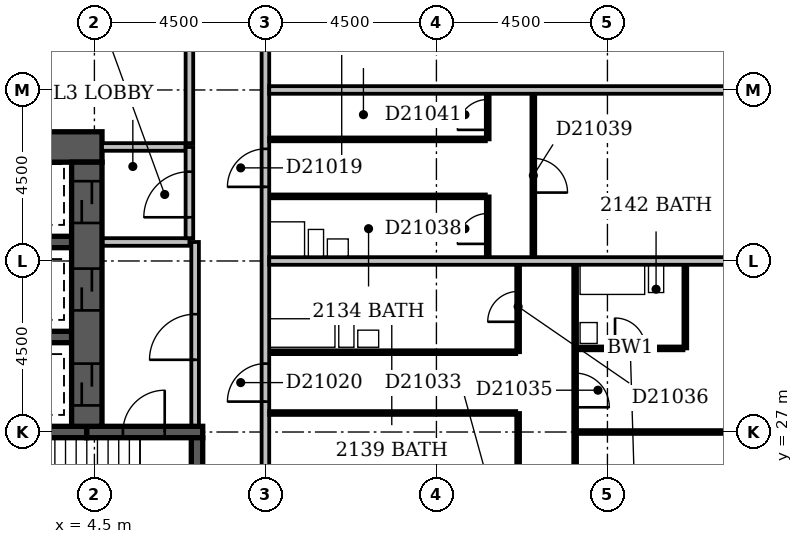
"""IFC4 building model, lengths in metres.
Left out: names, types, materials, properties, quantities, classifications, styles, units other than length and angle.
Written with IfcOpenShell. Run it as: python <this file> out.ifc"""

import sys

from ifc_helpers import new_model, si_unit, direction, frame, frame_2d, origin, place, context, subcontext, project, spatial, rectangle, extrude, element, fill, save


model = new_model("IFC4")
c1 = context("Model", 3, precision=1e-05, world=origin(), true_north=direction((0.0, 1.0)))
c2 = subcontext(c1, "Body", "Model", "MODEL_VIEW")
j1 = project(units=[si_unit("LENGTHUNIT", "METRE"), si_unit("PLANEANGLEUNIT", "RADIAN")], contexts=[c1])
p1 = place(None, origin())
s1 = spatial("IfcSite", under=j1, at=p1, CompositionType="ELEMENT")
p2 = place(p1, origin())
s2 = spatial("IfcBuilding", under=s1, at=p2, CompositionType="ELEMENT")
p3 = place(p2, frame((0.0, 0.0, 86.6)))
s3 = spatial("IfcBuildingStorey", under=s2, at=p3, CompositionType="ELEMENT", Elevation=86.6)
p4 = place(p3, frame((0.1, 34.5, -0.3), z_axis=(0.0, 0.0, 1.0), x_axis=(1.0, 0.0, 0.0)))
e1 = element("IfcWall", 1, at=p4, inside=s3, PredefinedType="SHEAR", context=c2, shape_type="SweptSolid", body=[
    extrude(rectangle(XDim=4.6, YDim=0.8, at=frame_2d((2.3, 0.0))), origin(), (0.0, 0.0, 1.0), 3.6),
])
p5 = place(p3, frame((0.35, 27.0, -0.3), z_axis=(0.0, 0.0, 1.0), x_axis=(1.0, 0.0, 0.0)))
e2 = element("IfcWall", 2, at=p5, inside=s3, PredefinedType="SHEAR", context=c2, shape_type="SweptSolid", body=[
    extrude(rectangle(XDim=3.95, YDim=0.3, at=frame_2d((1.975, 0.0))), origin(), (0.0, 0.0, 1.0), 3.6),
])
for number, where, z_axis, x_axis in (
    (3, (0.9, 29.5, -0.3), (0.0, 0.0, 1.0), (1.0, 0.0, 0.0)),
    (4, (0.9, 32.0, -0.3), (0.0, 0.0, 1.0), (1.0, 0.0, 0.0)),
):
    element("IfcWall", number, at=place(p3, frame(where, z_axis=z_axis, x_axis=x_axis)), inside=s3, PredefinedType="SHEAR", context=c2, shape_type="SweptSolid", body=[
        extrude(rectangle(XDim=3.0, YDim=0.3, at=frame_2d((1.5, 0.0))), origin(), (0.0, 0.0, 1.0), 3.6),
    ])
p6 = place(p3, frame((4.3, 27.0, -0.3), z_axis=(0.0, 0.0, 1.0), x_axis=(1.0, 0.0, 0.0)))
e5 = element("IfcWall", 5, at=p6, inside=s3, PredefinedType="SHEAR", context=c2, shape_type="SweptSolid", body=[
    extrude(rectangle(XDim=3.05, YDim=0.3, at=frame_2d((1.525, 0.0))), origin(), (0.0, 0.0, 1.0), 3.6),
])
p7 = place(p6, frame((0.95, 0.0, 0.3)))
e6 = element("IfcOpeningElement", 6, at=p7, cuts=e5, PredefinedType="OPENING", context=c2, shape_type="SweptSolid", body=[
    extrude(rectangle(XDim=1.1, YDim=2.1, at=frame_2d((0.55, 1.05))), frame((0.0, 0.162, 0.0), z_axis=(0.0, -1.0, 0.0), x_axis=(1.0, 0.0, 0.0)), (0.0, 0.0, 1.0), 0.324),
])
p8 = place(p3, frame((4.3, 27.15, -0.3), z_axis=(0.0, 0.0, 1.0), x_axis=(0.0, 1.0, 0.0)))
e7 = element("IfcWall", 7, at=p8, inside=s3, PredefinedType="SHEAR", context=c2, shape_type="SweptSolid", body=[
    extrude(rectangle(XDim=6.95, YDim=0.8, at=frame_2d((3.475, 0.0))), origin(), (0.0, 0.0, 1.0), 3.6),
])
p9 = place(p8, frame((3.05, 0.0, 0.3)))
e8 = element("IfcOpeningElement", 8, at=p9, cuts=e7, PredefinedType="OPENING", context=c2, shape_type="SweptSolid", body=[
    extrude(rectangle(XDim=1.1, YDim=2.1, at=frame_2d((0.55, 1.05))), frame((0.0, 0.412, 0.0), z_axis=(0.0, -1.0, 0.0), x_axis=(1.0, 0.0, 0.0)), (0.0, 0.0, 1.0), 0.824),
])
p10 = place(p8, frame((0.55, 0.0, 0.3)))
e9 = element("IfcOpeningElement", 9, at=p10, cuts=e7, PredefinedType="OPENING", context=c2, shape_type="SweptSolid", body=[
    extrude(rectangle(XDim=1.1, YDim=2.1, at=frame_2d((0.55, 1.05))), frame((0.0, 0.412, 0.0), z_axis=(0.0, -1.0, 0.0), x_axis=(1.0, 0.0, 0.0)), (0.0, 0.0, 1.0), 0.824),
])
p11 = place(p8, frame((5.35, 0.0, 0.3)))
e10 = element("IfcOpeningElement", 10, at=p11, cuts=e7, PredefinedType="OPENING", context=c2, shape_type="SweptSolid", body=[
    extrude(rectangle(XDim=1.1, YDim=2.1, at=frame_2d((0.55, 1.05))), frame((0.0, 0.412, 0.0), z_axis=(0.0, -1.0, 0.0), x_axis=(1.0, 0.0, 0.0)), (0.0, 0.0, 1.0), 0.824),
])
p12 = place(p3, frame((7.2, 22.65, -0.3), z_axis=(0.0, 0.0, 1.0), x_axis=(0.0, 1.0, 0.0)))
e11 = element("IfcWall", 11, at=p12, inside=s3, PredefinedType="SHEAR", context=c2, shape_type="SweptSolid", body=[
    extrude(rectangle(XDim=4.2, YDim=0.3, at=frame_2d((2.1, 0.0))), origin(), (0.0, 0.0, 1.0), 3.6),
])
p13 = place(p12, frame((0.8, 0.0, 0.3)))
e12 = element("IfcOpeningElement", 12, at=p13, cuts=e11, PredefinedType="OPENING", context=c2, shape_type="SweptSolid", body=[
    extrude(rectangle(XDim=1.1, YDim=2.1, at=frame_2d((0.55, 1.05))), frame((0.0, 0.162, 0.0), z_axis=(0.0, -1.0, 0.0), x_axis=(1.0, 0.0, 0.0)), (0.0, 0.0, 1.0), 0.324),
])
p14 = place(p3, frame((4.72, 32.0, 0.0), z_axis=(0.0, 0.0, 1.0), x_axis=(1.0, 0.0, 0.0)))
e13 = element("IfcWall", 13, at=p14, inside=s3, PredefinedType="PARTITIONING", context=c2, shape_type="SweptSolid", body=[
    extrude(rectangle(XDim=2.28, YDim=0.2, at=frame_2d((1.14, 0.0))), origin(), (0.0, 0.0, 1.0), 3.3),
])
p15 = place(p3, frame((7.0, 32.1, 0.0), z_axis=(0.0, 0.0, 1.0), x_axis=(0.0, 1.0, 0.0)))
e14 = element("IfcWall", 14, at=p15, inside=s3, PredefinedType="PARTITIONING", context=c2, shape_type="SweptSolid", body=[
    extrude(rectangle(XDim=2.4, YDim=0.2, at=frame_2d((1.2, 0.0))), origin(), (0.0, 0.0, 1.0), 3.3),
])
p16 = place(p15, frame((0.55, 0.0, 0.0)))
e15 = element("IfcOpeningElement", 15, at=p16, cuts=e14, PredefinedType="OPENING", context=c2, shape_type="SweptSolid", body=[
    extrude(rectangle(XDim=1.2, YDim=2.1, at=frame_2d((0.6, 1.05))), frame((0.0, 0.112, 0.0), z_axis=(0.0, -1.0, 0.0), x_axis=(1.0, 0.0, 0.0)), (0.0, 0.0, 1.0), 0.224),
])
p17 = place(p3, frame((4.7, 34.5, 0.0), z_axis=(0.0, 0.0, 1.0), x_axis=(1.0, 0.0, 0.0)))
e16 = element("IfcWall", 16, at=p17, inside=s3, PredefinedType="PARTITIONING", context=c2, shape_type="SweptSolid", body=[
    extrude(rectangle(XDim=2.2, YDim=0.2, at=frame_2d((1.1, 0.0))), origin(), (0.0, 0.0, 1.0), 3.3),
])
p18 = place(p3, frame((7.15, 27.17, 0.0), z_axis=(0.0, 0.0, 1.0), x_axis=(0.0, 1.0, 0.0)))
e17 = element("IfcWall", 17, at=p18, inside=s3, PredefinedType="PARTITIONING", context=c2, shape_type="SweptSolid", body=[
    extrude(rectangle(XDim=4.83, YDim=0.2, at=frame_2d((2.415, 0.0))), origin(), (0.0, 0.0, 1.0), 3.3),
])
p19 = place(p18, frame((1.73, 0.0, 0.0)))
e18 = element("IfcOpeningElement", 18, at=p19, cuts=e17, PredefinedType="OPENING", context=c2, shape_type="SweptSolid", body=[
    extrude(rectangle(XDim=1.2, YDim=2.1, at=frame_2d((0.6, 1.05))), frame((0.0, 0.112, 0.0), z_axis=(0.0, -1.0, 0.0), x_axis=(1.0, 0.0, 0.0)), (0.0, 0.0, 1.0), 0.224),
])
p20 = place(p3, frame((9.0, 5.0, 0.0), z_axis=(0.0, 0.0, 1.0), x_axis=(0.0, 1.0, 0.0)))
e19 = element("IfcWall", 19, at=p20, inside=s3, PredefinedType="PARTITIONING", context=c2, shape_type="SweptSolid", body=[
    extrude(rectangle(XDim=44.5, YDim=0.2, at=frame_2d((22.25, 0.0))), origin(), (0.0, 0.0, 1.0), 3.3),
])
p21 = place(p20, frame((28.45, 0.0, 0.0)))
e20 = element("IfcOpeningElement", 20, at=p21, cuts=e19, PredefinedType="OPENING", context=c2, shape_type="SweptSolid", body=[
    extrude(rectangle(XDim=1.0, YDim=2.1, at=frame_2d((0.5, 1.05))), frame((0.0, 0.112, 0.0), z_axis=(0.0, -1.0, 0.0), x_axis=(1.0, 0.0, 0.0)), (0.0, 0.0, 1.0), 0.224),
])
p22 = place(p20, frame((22.8, 0.0, 0.0)))
e21 = element("IfcOpeningElement", 21, at=p22, cuts=e19, PredefinedType="OPENING", context=c2, shape_type="SweptSolid", body=[
    extrude(rectangle(XDim=1.0, YDim=2.1, at=frame_2d((0.5, 1.05))), frame((0.0, 0.112, 0.0), z_axis=(0.0, -1.0, 0.0), x_axis=(1.0, 0.0, 0.0)), (0.0, 0.0, 1.0), 0.224),
])
p23 = place(p20, frame((14.55, 0.0, 0.0)))
e22 = element("IfcOpeningElement", 22, at=p23, cuts=e19, PredefinedType="OPENING", context=c2, shape_type="SweptSolid", body=[
    extrude(rectangle(XDim=1.0, YDim=2.1, at=frame_2d((0.5, 1.05))), frame((0.0, 0.112, 0.0), z_axis=(0.0, -1.0, 0.0), x_axis=(1.0, 0.0, 0.0)), (0.0, 0.0, 1.0), 0.224),
])
p24 = place(p20, frame((9.3, 0.0, 0.0)))
e23 = element("IfcOpeningElement", 23, at=p24, cuts=e19, PredefinedType="OPENING", context=c2, shape_type="SweptSolid", body=[
    extrude(rectangle(XDim=1.0, YDim=2.1, at=frame_2d((0.5, 1.05))), frame((0.0, 0.112, 0.0), z_axis=(0.0, -1.0, 0.0), x_axis=(1.0, 0.0, 0.0)), (0.0, 0.0, 1.0), 0.224),
])
p25 = place(p20, frame((35.0, 0.0, 0.0)))
e24 = element("IfcOpeningElement", 24, at=p25, cuts=e19, PredefinedType="OPENING", context=c2, shape_type="SweptSolid", body=[
    extrude(rectangle(XDim=0.9, YDim=2.1, at=frame_2d((0.45, 1.05))), frame((0.0, 0.112, 0.0), z_axis=(0.0, -1.0, 0.0), x_axis=(1.0, 0.0, 0.0)), (0.0, 0.0, 1.0), 0.224),
])
p26 = place(p20, frame((1.5, 0.0, 0.0)))
e25 = element("IfcOpeningElement", 25, at=p26, cuts=e19, PredefinedType="OPENING", context=c2, shape_type="SweptSolid", body=[
    extrude(rectangle(XDim=0.9, YDim=2.1, at=frame_2d((0.45, 1.05))), frame((0.0, 0.112, 0.0), z_axis=(0.0, -1.0, 0.0), x_axis=(1.0, 0.0, 0.0)), (0.0, 0.0, 1.0), 0.224),
])
p27 = place(p3, frame((15.65, 22.6, 0.0), z_axis=(0.0, 0.0, 1.0), x_axis=(0.0, 1.0, 0.0)))
e26 = element("IfcWall", 26, at=p27, inside=s3, PredefinedType="PARTITIONING", context=c2, shape_type="SweptSolid", body=[
    extrude(rectangle(XDim=4.9, YDim=0.1, at=frame_2d((2.45, 0.0))), origin(), (0.0, 0.0, 1.0), 3.3),
])
p28 = place(p27, frame((1.95, 0.0, 0.0)))
e27 = element("IfcOpeningElement", 27, at=p28, cuts=e26, PredefinedType="OPENING", context=c2, shape_type="SweptSolid", body=[
    extrude(rectangle(XDim=0.9, YDim=2.1, at=frame_2d((0.45, 1.05))), frame((0.0, 0.062, 0.0), z_axis=(0.0, -1.0, 0.0), x_axis=(1.0, 0.0, 0.0)), (0.0, 0.0, 1.0), 0.124),
])
p29 = place(p3, frame((17.15, 22.6, 0.0), z_axis=(0.0, 0.0, 1.0), x_axis=(0.0, 1.0, 0.0)))
e28 = element("IfcWall", 28, at=p29, inside=s3, PredefinedType="PARTITIONING", context=c2, shape_type="SweptSolid", body=[
    extrude(rectangle(XDim=8.8, YDim=0.1, at=frame_2d((4.4, 0.0))), origin(), (0.0, 0.0, 1.0), 3.3),
])
p30 = place(p29, frame((1.7, 0.0, 0.0)))
e29 = element("IfcOpeningElement", 29, at=p30, cuts=e28, PredefinedType="OPENING", context=c2, shape_type="SweptSolid", body=[
    extrude(rectangle(XDim=0.9, YDim=2.1, at=frame_2d((0.45, 1.05))), frame((0.0, 0.062, 0.0), z_axis=(0.0, -1.0, 0.0), x_axis=(1.0, 0.0, 0.0)), (0.0, 0.0, 1.0), 0.124),
])
p31 = place(p29, frame((5.05, 0.0, 0.0)))
e30 = element("IfcOpeningElement", 30, at=p31, cuts=e28, PredefinedType="OPENING", context=c2, shape_type="SweptSolid", body=[
    extrude(rectangle(XDim=0.9, YDim=2.1, at=frame_2d((0.45, 1.05))), frame((0.0, 0.062, 0.0), z_axis=(0.0, -1.0, 0.0), x_axis=(1.0, 0.0, 0.0)), (0.0, 0.0, 1.0), 0.124),
])
p32 = place(p3, frame((17.2, 27.0, 0.0), z_axis=(0.0, 0.0, 1.0), x_axis=(1.0, 0.0, 0.0)))
e31 = element("IfcWall", 31, at=p32, inside=s3, PredefinedType="PARTITIONING", context=c2, shape_type="SweptSolid", body=[
    extrude(rectangle(XDim=4.7, YDim=0.1, at=frame_2d((2.35, 0.0))), origin(), (0.0, 0.0, 1.0), 2.7),
])
p33 = place(p3, frame((9.1, 27.5, 0.0), z_axis=(0.0, 0.0, 1.0), x_axis=(1.0, 0.0, 0.0)))
e32 = element("IfcWall", 32, at=p33, inside=s3, PredefinedType="PARTITIONING", context=c2, shape_type="SweptSolid", body=[
    extrude(rectangle(XDim=6.5, YDim=0.1, at=frame_2d((3.25, 0.0))), origin(), (0.0, 0.0, 1.0), 2.7),
])
p34 = place(p3, frame((9.1, 29.1, 0.0), z_axis=(0.0, 0.0, 1.0), x_axis=(1.0, 0.0, 0.0)))
e33 = element("IfcWall", 33, at=p34, inside=s3, PredefinedType="PLUMBINGWALL", context=c2, shape_type="SweptSolid", body=[
    extrude(rectangle(XDim=6.5, YDim=0.1, at=frame_2d((3.25, 0.0))), origin(), (0.0, 0.0, 1.0), 3.3),
])
p35 = place(p3, frame((15.65, 29.1, 0.0), z_axis=(0.0, 0.0, 1.0), x_axis=(0.0, 1.0, 0.0)))
e34 = element("IfcWall", 34, at=p35, inside=s3, PredefinedType="PARTITIONING", context=c2, shape_type="SweptSolid", body=[
    extrude(rectangle(XDim=2.3, YDim=0.1, at=frame_2d((1.15, 0.0))), origin(), (0.0, 0.0, 1.0), 3.3),
])
p36 = place(p35, frame((0.8, 0.0, 0.0)))
e35 = element("IfcOpeningElement", 35, at=p36, cuts=e34, PredefinedType="OPENING", context=c2, shape_type="SweptSolid", body=[
    extrude(rectangle(XDim=0.8, YDim=2.1, at=frame_2d((0.4, 1.05))), frame((0.0, 0.062, 0.0), z_axis=(0.0, -1.0, 0.0), x_axis=(1.0, 0.0, 0.0)), (0.0, 0.0, 1.0), 0.124),
])
p37 = place(p3, frame((17.2, 29.2, 0.0), z_axis=(0.0, 0.0, 1.0), x_axis=(1.0, 0.0, 0.0)))
e36 = element("IfcWall", 36, at=p37, inside=s3, PredefinedType="PLUMBINGWALL", context=c2, shape_type="SweptSolid", body=[
    extrude(rectangle(XDim=2.8, YDim=0.1, at=frame_2d((1.4, 0.0))), origin(), (0.0, 0.0, 1.0), 3.3),
])
p38 = place(p37, frame((1.0, 0.0, 0.0)))
e37 = element("IfcOpeningElement", 37, at=p38, cuts=e36, PredefinedType="OPENING", context=c2, shape_type="SweptSolid", body=[
    extrude(rectangle(XDim=0.8, YDim=2.1, at=frame_2d((0.4, 1.05))), frame((0.0, 0.062, 0.0), z_axis=(0.0, -1.0, 0.0), x_axis=(1.0, 0.0, 0.0)), (0.0, 0.0, 1.0), 0.124),
])
p39 = place(p3, frame((20.05, 29.2, 0.0), z_axis=(0.0, 0.0, 1.0), x_axis=(0.0, 1.0, 0.0)))
e38 = element("IfcWall", 38, at=p39, inside=s3, PredefinedType="PLUMBINGWALL", context=c2, shape_type="SweptSolid", body=[
    extrude(rectangle(XDim=2.2, YDim=0.1, at=frame_2d((1.1, 0.0))), origin(), (0.0, 0.0, 1.0), 3.3),
])
p40 = place(p3, frame((9.1, 31.5, 0.0), z_axis=(0.0, 0.0, 1.0), x_axis=(1.0, 0.0, 0.0)))
e39 = element("IfcWall", 39, at=p40, inside=s3, PredefinedType="PARTITIONING", context=c2, shape_type="SweptSolid", body=[
    extrude(rectangle(XDim=12.8, YDim=0.2, at=frame_2d((6.4, 0.0))), origin(), (0.0, 0.0, 1.0), 3.3),
])
p41 = place(p3, frame((14.85, 31.6, 0.0), z_axis=(0.0, 0.0, 1.0), x_axis=(0.0, 1.0, 0.0)))
e40 = element("IfcWall", 40, at=p41, inside=s3, PredefinedType="PARTITIONING", context=c2, shape_type="SweptSolid", body=[
    extrude(rectangle(XDim=1.6, YDim=0.1, at=frame_2d((0.8, 0.0))), origin(), (0.0, 0.0, 1.0), 3.3),
])
p42 = place(p41, frame((0.35, 0.0, 0.0)))
e41 = element("IfcOpeningElement", 41, at=p42, cuts=e40, PredefinedType="OPENING", context=c2, shape_type="SweptSolid", body=[
    extrude(rectangle(XDim=0.8, YDim=2.1, at=frame_2d((0.4, 1.05))), frame((0.0, 0.062, 0.0), z_axis=(0.0, -1.0, 0.0), x_axis=(1.0, 0.0, 0.0)), (0.0, 0.0, 1.0), 0.124),
])
p43 = place(p3, frame((16.05, 31.6, 0.0), z_axis=(0.0, 0.0, 1.0), x_axis=(0.0, 1.0, 0.0)))
e42 = element("IfcWall", 42, at=p43, inside=s3, PredefinedType="PARTITIONING", context=c2, shape_type="SweptSolid", body=[
    extrude(rectangle(XDim=4.3, YDim=0.1, at=frame_2d((2.15, 0.0))), origin(), (0.0, 0.0, 1.0), 3.3),
])
p44 = place(p43, frame((1.7, 0.0, 0.0)))
e43 = element("IfcOpeningElement", 43, at=p44, cuts=e42, PredefinedType="OPENING", context=c2, shape_type="SweptSolid", body=[
    extrude(rectangle(XDim=0.9, YDim=2.1, at=frame_2d((0.45, 1.05))), frame((0.0, 0.062, 0.0), z_axis=(0.0, -1.0, 0.0), x_axis=(1.0, 0.0, 0.0)), (0.0, 0.0, 1.0), 0.124),
])
p45 = place(p3, frame((9.1, 33.2, 0.0), z_axis=(0.0, 0.0, 1.0), x_axis=(1.0, 0.0, 0.0)))
e44 = element("IfcWall", 44, at=p45, inside=s3, PredefinedType="PLUMBINGWALL", context=c2, shape_type="SweptSolid", body=[
    extrude(rectangle(XDim=5.7, YDim=0.1, at=frame_2d((2.85, 0.0))), origin(), (0.0, 0.0, 1.0), 3.3),
])
p46 = place(p3, frame((7.0, 34.6, 0.0), z_axis=(0.0, 0.0, 1.0), x_axis=(0.0, 1.0, 0.0)))
e45 = element("IfcWall", 45, at=p46, inside=s3, PredefinedType="PARTITIONING", context=c2, shape_type="SweptSolid", body=[
    extrude(rectangle(XDim=14.8, YDim=0.2, at=frame_2d((7.4, 0.0))), origin(), (0.0, 0.0, 1.0), 3.3),
])
p47 = place(p46, frame((6.95, 0.0, 0.0)))
e46 = element("IfcOpeningElement", 46, at=p47, cuts=e45, PredefinedType="OPENING", context=c2, shape_type="SweptSolid", body=[
    extrude(rectangle(XDim=0.9, YDim=2.1, at=frame_2d((0.45, 1.05))), frame((0.0, 0.112, 0.0), z_axis=(0.0, -1.0, 0.0), x_axis=(1.0, 0.0, 0.0)), (0.0, 0.0, 1.0), 0.224),
])
p48 = place(p3, frame((9.1, 34.7, 0.0), z_axis=(0.0, 0.0, 1.0), x_axis=(1.0, 0.0, 0.0)))
e47 = element("IfcWall", 47, at=p48, inside=s3, PredefinedType="PARTITIONING", context=c2, shape_type="SweptSolid", body=[
    extrude(rectangle(XDim=5.7, YDim=0.1, at=frame_2d((2.85, 0.0))), origin(), (0.0, 0.0, 1.0), 3.3),
])
p49 = place(p3, frame((14.85, 34.7, 0.0), z_axis=(0.0, 0.0, 1.0), x_axis=(0.0, 1.0, 0.0)))
e48 = element("IfcWall", 48, at=p49, inside=s3, PredefinedType="PARTITIONING", context=c2, shape_type="SweptSolid", body=[
    extrude(rectangle(XDim=1.2, YDim=0.1, at=frame_2d((0.6, 0.0))), origin(), (0.0, 0.0, 1.0), 3.3),
])
p50 = place(p49, frame((0.25, 0.0, 0.0)))
e49 = element("IfcOpeningElement", 49, at=p50, cuts=e48, PredefinedType="OPENING", context=c2, shape_type="SweptSolid", body=[
    extrude(rectangle(XDim=0.8, YDim=2.1, at=frame_2d((0.4, 1.05))), frame((0.0, 0.062, 0.0), z_axis=(0.0, -1.0, 0.0), x_axis=(1.0, 0.0, 0.0)), (0.0, 0.0, 1.0), 0.124),
])
p51 = place(p3, frame((9.1, 36.0, 0.0), z_axis=(0.0, 0.0, 1.0), x_axis=(1.0, 0.0, 0.0)))
e50 = element("IfcWall", 50, at=p51, inside=s3, PredefinedType="PARTITIONING", context=c2, shape_type="SweptSolid", body=[
    extrude(rectangle(XDim=12.8, YDim=0.2, at=frame_2d((6.4, 0.0))), origin(), (0.0, 0.0, 1.0), 2.4),
])
p52 = place(p19, origin())
e51 = element("IfcDoor", 51, at=p52, inside=s3, OperationType="SINGLE_SWING_LEFT", PredefinedType="DOOR", context=c2, shape_type="SweptSolid", body=[
    extrude(rectangle(XDim=1.2, YDim=2.1, at=frame_2d((0.6, 1.05))), frame((0.0, 0.025, 0.0), z_axis=(0.0, -1.0, 0.0), x_axis=(1.0, 0.0, 0.0)), (0.0, 0.0, 1.0), 0.05),
])
fill(e18, e51)
p53 = place(p9, origin())
e52 = element("IfcDoor", 52, at=p53, inside=s3, OperationType="SLIDING_TO_LEFT", PredefinedType="DOOR", context=c2, shape_type="SweptSolid", body=[
    extrude(rectangle(XDim=1.1, YDim=2.1, at=frame_2d((0.55, 1.05))), frame((0.0, 0.025, 0.0), z_axis=(0.0, -1.0, 0.0), x_axis=(1.0, 0.0, 0.0)), (0.0, 0.0, 1.0), 0.05),
])
fill(e8, e52)
p54 = place(p10, origin())
e53 = element("IfcDoor", 53, at=p54, inside=s3, OperationType="SLIDING_TO_LEFT", PredefinedType="DOOR", context=c2, shape_type="SweptSolid", body=[
    extrude(rectangle(XDim=1.1, YDim=2.1, at=frame_2d((0.55, 1.05))), frame((0.0, 0.025, 0.0), z_axis=(0.0, -1.0, 0.0), x_axis=(1.0, 0.0, 0.0)), (0.0, 0.0, 1.0), 0.05),
])
fill(e9, e53)
p55 = place(p16, origin())
e54 = element("IfcDoor", 54, at=p55, inside=s3, OperationType="SINGLE_SWING_LEFT", PredefinedType="DOOR", context=c2, shape_type="SweptSolid", body=[
    extrude(rectangle(XDim=1.2, YDim=2.1, at=frame_2d((0.6, 1.05))), frame((0.0, 0.025, 0.0), z_axis=(0.0, -1.0, 0.0), x_axis=(1.0, 0.0, 0.0)), (0.0, 0.0, 1.0), 0.05),
])
fill(e15, e54)
p56 = place(p11, origin())
e55 = element("IfcDoor", 55, at=p56, inside=s3, OperationType="SLIDING_TO_LEFT", PredefinedType="DOOR", context=c2, shape_type="SweptSolid", body=[
    extrude(rectangle(XDim=1.1, YDim=2.1, at=frame_2d((0.55, 1.05))), frame((0.0, 0.025, 0.0), z_axis=(0.0, -1.0, 0.0), x_axis=(1.0, 0.0, 0.0)), (0.0, 0.0, 1.0), 0.05),
])
fill(e10, e55)
p57 = place(p7, frame((1.1, 0.0, 0.0), z_axis=(0.0, 0.0, 1.0), x_axis=(-1.0, 0.0, 0.0)))
e56 = element("IfcDoor", 56, at=p57, inside=s3, OperationType="SINGLE_SWING_LEFT", PredefinedType="DOOR", context=c2, shape_type="SweptSolid", body=[
    extrude(rectangle(XDim=1.1, YDim=2.1, at=frame_2d((0.55, 1.05))), frame((0.0, 0.025, 0.0), z_axis=(0.0, -1.0, 0.0), x_axis=(1.0, 0.0, 0.0)), (0.0, 0.0, 1.0), 0.05),
])
fill(e6, e56)
p58 = place(p21, origin())
e57 = element("IfcDoor", 57, at=p58, inside=s3, OperationType="SINGLE_SWING_LEFT", PredefinedType="DOOR", context=c2, shape_type="SweptSolid", body=[
    extrude(rectangle(XDim=1.0, YDim=2.1, at=frame_2d((0.5, 1.05))), frame((0.0, 0.025, 0.0), z_axis=(0.0, -1.0, 0.0), x_axis=(1.0, 0.0, 0.0)), (0.0, 0.0, 1.0), 0.05),
])
fill(e20, e57)
p59 = place(p22, origin())
e58 = element("IfcDoor", 58, at=p59, inside=s3, OperationType="SINGLE_SWING_LEFT", PredefinedType="DOOR", context=c2, shape_type="SweptSolid", body=[
    extrude(rectangle(XDim=1.0, YDim=2.1, at=frame_2d((0.5, 1.05))), frame((0.0, 0.025, 0.0), z_axis=(0.0, -1.0, 0.0), x_axis=(1.0, 0.0, 0.0)), (0.0, 0.0, 1.0), 0.05),
])
fill(e21, e58)
p60 = place(p31, frame((0.9, 0.0, 0.0), z_axis=(0.0, 0.0, 1.0), x_axis=(-1.0, 0.0, 0.0)))
e59 = element("IfcDoor", 59, at=p60, inside=s3, OperationType="SINGLE_SWING_RIGHT", PredefinedType="DOOR", context=c2, shape_type="SweptSolid", body=[
    extrude(rectangle(XDim=0.9, YDim=2.1, at=frame_2d((0.45, 1.05))), frame((0.0, 0.025, 0.0), z_axis=(0.0, -1.0, 0.0), x_axis=(1.0, 0.0, 0.0)), (0.0, 0.0, 1.0), 0.05),
])
fill(e30, e59)
p61 = place(p36, origin())
e60 = element("IfcDoor", 60, at=p61, inside=s3, OperationType="SINGLE_SWING_LEFT", PredefinedType="DOOR", context=c2, shape_type="SweptSolid", body=[
    extrude(rectangle(XDim=0.8, YDim=2.1, at=frame_2d((0.4, 1.05))), frame((0.0, 0.025, 0.0), z_axis=(0.0, -1.0, 0.0), x_axis=(1.0, 0.0, 0.0)), (0.0, 0.0, 1.0), 0.05),
])
fill(e35, e60)
p62 = place(p38, origin())
e61 = element("IfcDoor", 61, at=p62, inside=s3, OperationType="SINGLE_SWING_LEFT", PredefinedType="DOOR", context=c2, shape_type="SweptSolid", body=[
    extrude(rectangle(XDim=0.8, YDim=2.1, at=frame_2d((0.4, 1.05))), frame((0.0, 0.025, 0.0), z_axis=(0.0, -1.0, 0.0), x_axis=(1.0, 0.0, 0.0)), (0.0, 0.0, 1.0), 0.05),
])
fill(e37, e61)
p63 = place(p42, origin())
e62 = element("IfcDoor", 62, at=p63, inside=s3, OperationType="SINGLE_SWING_LEFT", PredefinedType="DOOR", context=c2, shape_type="SweptSolid", body=[
    extrude(rectangle(XDim=0.8, YDim=2.1, at=frame_2d((0.4, 1.05))), frame((0.0, 0.025, 0.0), z_axis=(0.0, -1.0, 0.0), x_axis=(1.0, 0.0, 0.0)), (0.0, 0.0, 1.0), 0.05),
])
fill(e41, e62)
p64 = place(p44, frame((0.9, 0.0, 0.0), z_axis=(0.0, 0.0, 1.0), x_axis=(-1.0, 0.0, 0.0)))
e63 = element("IfcDoor", 63, at=p64, inside=s3, OperationType="SINGLE_SWING_RIGHT", PredefinedType="DOOR", context=c2, shape_type="SweptSolid", body=[
    extrude(rectangle(XDim=0.9, YDim=2.1, at=frame_2d((0.45, 1.05))), frame((0.0, 0.025, 0.0), z_axis=(0.0, -1.0, 0.0), x_axis=(1.0, 0.0, 0.0)), (0.0, 0.0, 1.0), 0.05),
])
fill(e43, e63)
p65 = place(p50, origin())
e64 = element("IfcDoor", 64, at=p65, inside=s3, OperationType="SINGLE_SWING_LEFT", PredefinedType="DOOR", context=c2, shape_type="SweptSolid", body=[
    extrude(rectangle(XDim=0.8, YDim=2.1, at=frame_2d((0.4, 1.05))), frame((0.0, 0.025, 0.0), z_axis=(0.0, -1.0, 0.0), x_axis=(1.0, 0.0, 0.0)), (0.0, 0.0, 1.0), 0.05),
])
fill(e49, e64)
save(model, sys.argv[1])
